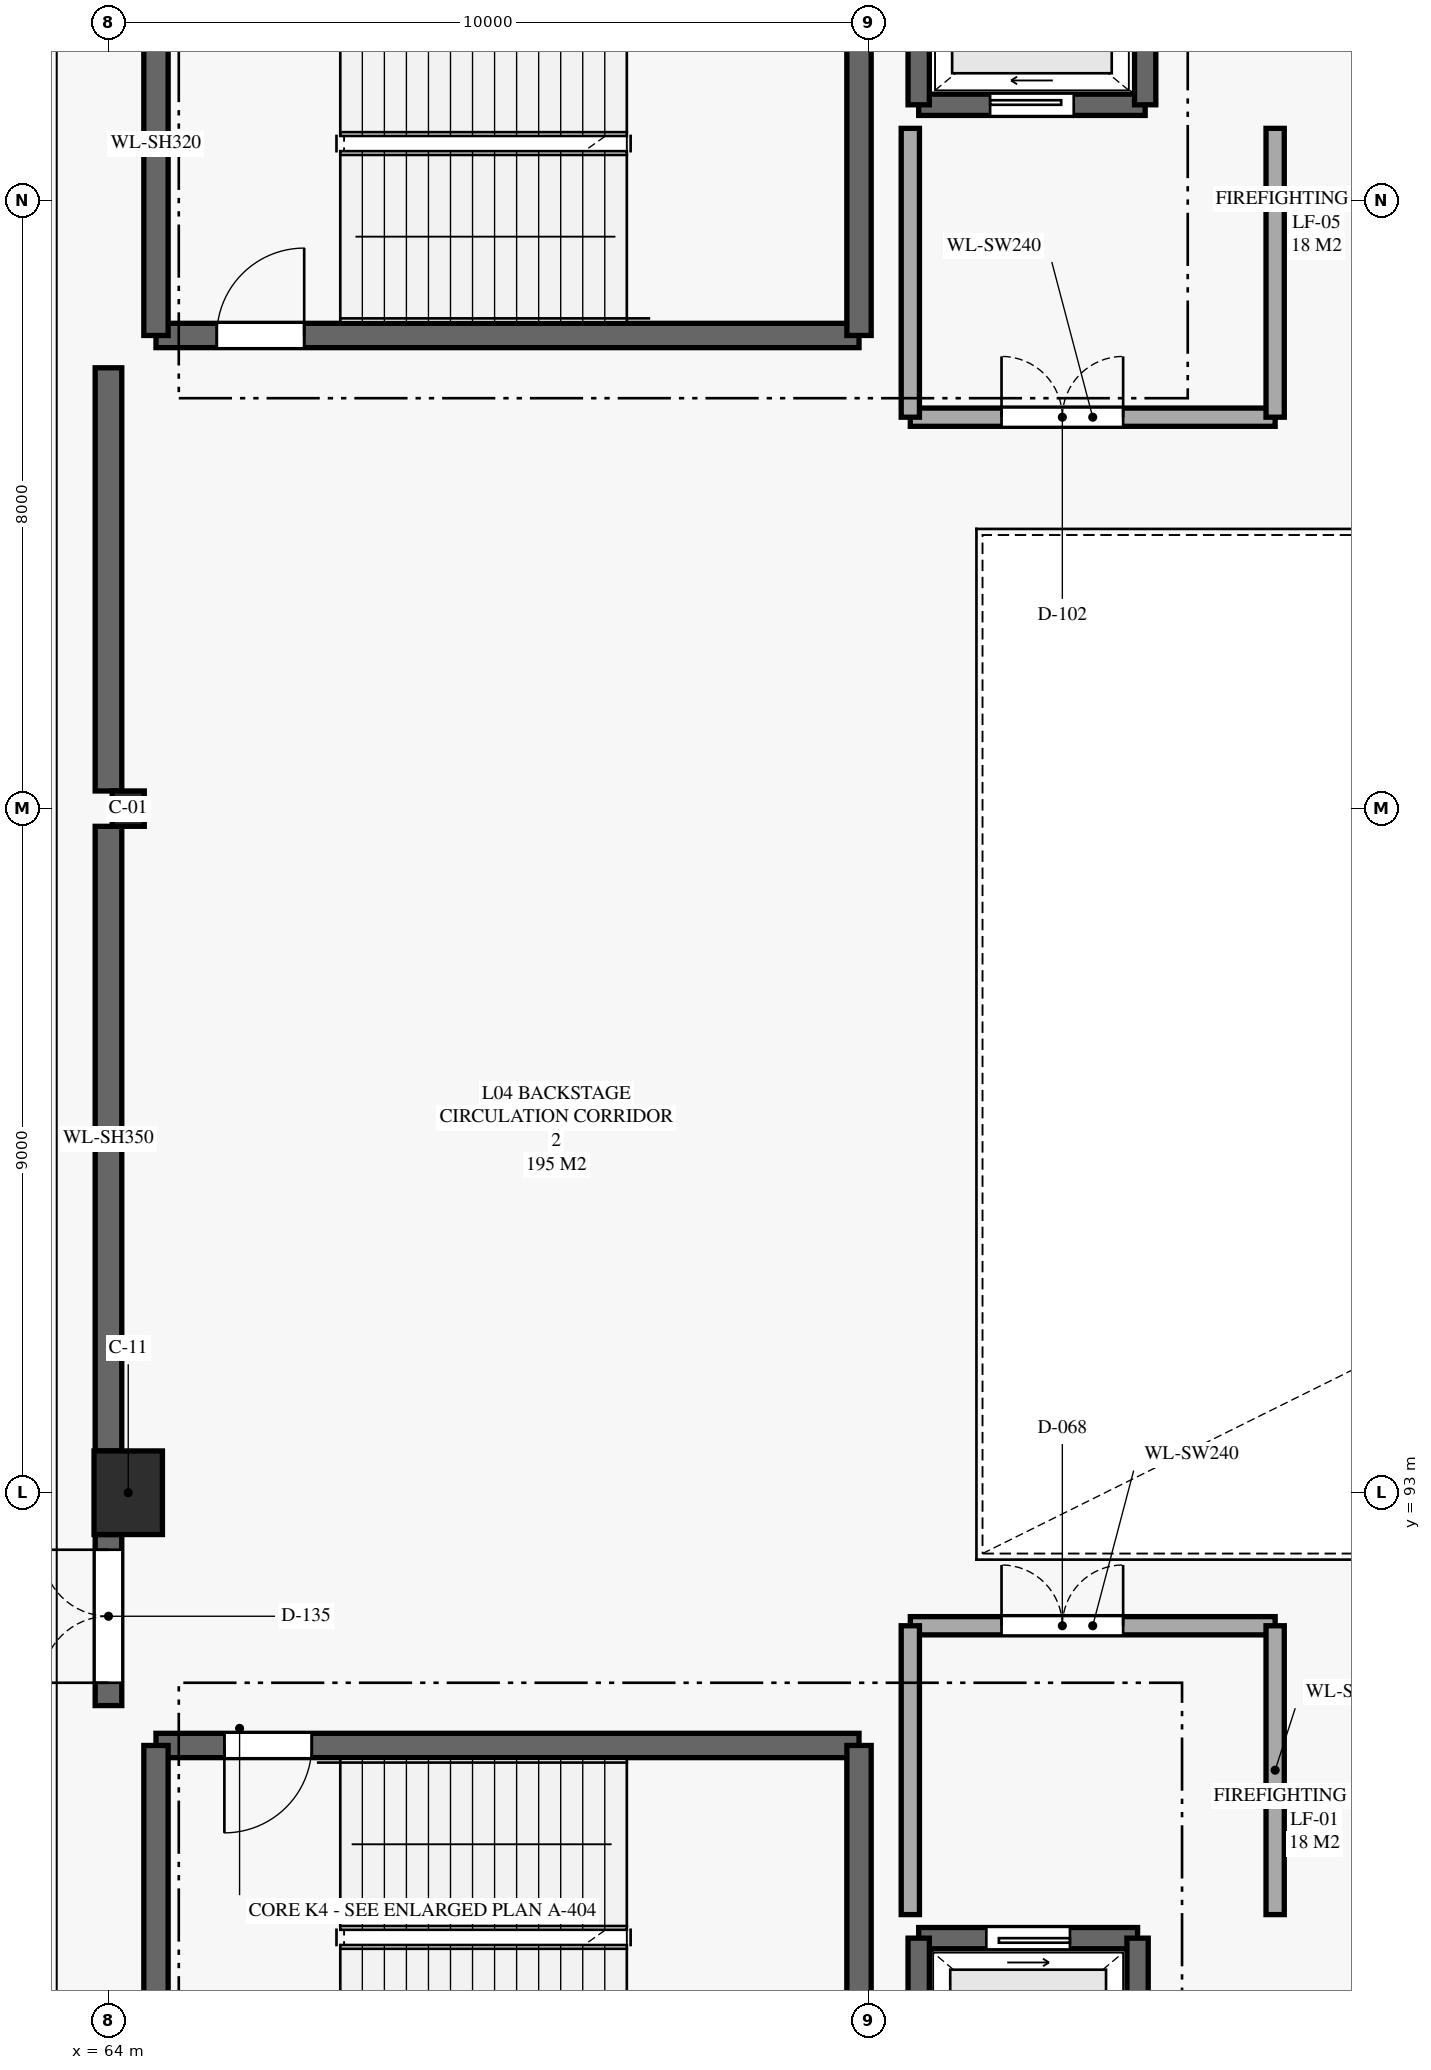
"""IFC4 building model, lengths in metres.
Left out: names, types, materials, properties, quantities, classifications, styles, units other than length and angle.
Written with IfcOpenShell. Run it as: python <this file> out.ifc"""

import sys

from ifc_helpers import new_model, si_unit, direction, frame, frame_2d, origin, origin_2d, place, context, subcontext, project, spatial, rectangle, i_section, extrude, element, fill, save


model = new_model("IFC4")
c1 = context("Model", 3, precision=1e-05, world=origin(), true_north=direction((0.0, 1.0)))
c2 = subcontext(c1, "Body", "Model", "MODEL_VIEW")
j1 = project(units=[si_unit("LENGTHUNIT", "METRE"), si_unit("PLANEANGLEUNIT", "RADIAN")], contexts=[c1])
p1 = place(None, origin())
s1 = spatial("IfcSite", under=j1, at=p1, CompositionType="ELEMENT")
p2 = place(p1, origin())
s2 = spatial("IfcBuilding", under=s1, at=p2, CompositionType="ELEMENT")
p3 = place(p2, frame((0.0, 0.0, 20.0)))
s3 = spatial("IfcBuildingStorey", under=s2, at=p3, CompositionType="ELEMENT", Elevation=20.0)
p4 = place(p3, frame((64.26, 93.0, 0.0), z_axis=(0.0, 0.0, 1.0), x_axis=(1.0, 0.0, 0.0)))
e1 = element("IfcColumn", 1, at=p4, inside=s3, PredefinedType="COLUMN", context=c2, shape_type="SweptSolid", body=[
    extrude(rectangle(XDim=0.9, YDim=1.1, at=origin_2d()), origin(), (0.0, 0.0, 1.0), 4.8),
])
p5 = place(p3, frame((64.26, 102.0, 0.0), z_axis=(0.0, 0.0, 1.0), x_axis=(1.0, 0.0, 0.0)))
e2 = element("IfcColumn", 2, at=p5, inside=s3, PredefinedType="COLUMN", context=c2, shape_type="SweptSolid", body=[
    extrude(i_section(OverallWidth=0.422, OverallDepth=0.465, WebThickness=0.045, FlangeThickness=0.073, FilletRadius=0.02, at=origin_2d()), origin(), (0.0, 0.0, 1.0), 4.8),
])
p6 = place(p3, frame((64.625, 108.225, 0.0), z_axis=(0.0, 0.0, 1.0), x_axis=(1.0, 0.0, 0.0)))
e3 = element("IfcWall", 3, at=p6, inside=s3, PredefinedType="SHEAR", context=c2, shape_type="SweptSolid", body=[
    extrude(rectangle(XDim=9.25, YDim=0.32, at=frame_2d((4.625, 0.0))), origin(), (0.0, 0.0, 1.0), 4.5),
])
p7 = place(p6, frame((0.8, 0.0, 0.0)))
e4 = element("IfcOpeningElement", 4, at=p7, cuts=e3, PredefinedType="OPENING", context=c2, shape_type="SweptSolid", body=[
    extrude(rectangle(XDim=1.15, YDim=2.2, at=frame_2d((0.575, 1.1))), frame((0.0, 0.17, 0.0), z_axis=(0.0, -1.0, 0.0), x_axis=(1.0, 0.0, 0.0)), (0.0, 0.0, 1.0), 0.34),
])
for number, where, z_axis, x_axis in (
    (5, (64.625, 113.275, 0.0), (0.0, 0.0, 1.0), (0.0, -1.0, 0.0)),
    (6, (73.875, 108.225, 0.0), (0.0, 0.0, 1.0), (0.0, 1.0, 0.0)),
):
    element("IfcWall", number, at=place(p3, frame(where, z_axis=z_axis, x_axis=x_axis)), inside=s3, PredefinedType="SHEAR", context=c2, shape_type="SweptSolid", body=[
        extrude(rectangle(XDim=5.05, YDim=0.32, at=frame_2d((2.525, 0.0))), origin(), (0.0, 0.0, 1.0), 4.5),
    ])
p8 = place(p3, frame((73.875, 89.675, 0.0), z_axis=(0.0, 0.0, 1.0), x_axis=(-1.0, 0.0, 0.0)))
e7 = element("IfcWall", 7, at=p8, inside=s3, PredefinedType="SHEAR", context=c2, shape_type="SweptSolid", body=[
    extrude(rectangle(XDim=9.25, YDim=0.32, at=frame_2d((4.625, 0.0))), origin(), (0.0, 0.0, 1.0), 4.5),
])
p9 = place(p8, frame((7.2, 0.0, 0.0)))
e8 = element("IfcOpeningElement", 8, at=p9, cuts=e7, PredefinedType="OPENING", context=c2, shape_type="SweptSolid", body=[
    extrude(rectangle(XDim=1.15, YDim=2.2, at=frame_2d((0.575, 1.1))), frame((0.0, 0.17, 0.0), z_axis=(0.0, -1.0, 0.0), x_axis=(1.0, 0.0, 0.0)), (0.0, 0.0, 1.0), 0.34),
])
for number, where, z_axis, x_axis in (
    (9, (64.625, 89.675, 0.0), (0.0, 0.0, 1.0), (0.0, -1.0, 0.0)),
    (10, (73.875, 84.625, 0.0), (0.0, 0.0, 1.0), (0.0, 1.0, 0.0)),
):
    element("IfcWall", number, at=place(p3, frame(where, z_axis=z_axis, x_axis=x_axis)), inside=s3, PredefinedType="SHEAR", context=c2, shape_type="SweptSolid", body=[
        extrude(rectangle(XDim=5.05, YDim=0.32, at=frame_2d((2.525, 0.0))), origin(), (0.0, 0.0, 1.0), 4.5),
    ])
p10 = place(p3, frame((77.54, 87.14, 0.0), z_axis=(0.0, 0.0, 1.0), x_axis=(-1.0, 0.0, 0.0)))
e11 = element("IfcWall", 11, at=p10, inside=s3, PredefinedType="SHEAR", context=c2, shape_type="SweptSolid", body=[
    extrude(rectangle(XDim=2.88, YDim=0.28, at=frame_2d((1.44, 0.0))), origin(), (0.0, 0.0, 1.0), 4.5),
])
p11 = place(p10, frame((0.89, 0.0, 0.0)))
e12 = element("IfcOpeningElement", 12, at=p11, cuts=e11, PredefinedType="OPENING", context=c2, shape_type="SweptSolid", body=[
    extrude(rectangle(XDim=1.1, YDim=2.2, at=frame_2d((0.55, 1.1))), frame((0.0, 0.15, 0.0), z_axis=(0.0, -1.0, 0.0), x_axis=(1.0, 0.0, 0.0)), (0.0, 0.0, 1.0), 0.3),
])
for number, where, z_axis, x_axis in (
    (13, (74.66, 87.14, 0.0), (0.0, 0.0, 1.0), (0.0, -1.0, 0.0)),
    (14, (77.54, 84.66, 0.0), (0.0, 0.0, 1.0), (0.0, 1.0, 0.0)),
):
    element("IfcWall", number, at=place(p3, frame(where, z_axis=z_axis, x_axis=x_axis)), inside=s3, PredefinedType="SHEAR", context=c2, shape_type="SweptSolid", body=[
        extrude(rectangle(XDim=2.48, YDim=0.28, at=frame_2d((1.24, 0.0))), origin(), (0.0, 0.0, 1.0), 4.5),
    ])
p12 = place(p3, frame((74.55, 91.25, 0.0), z_axis=(0.0, 0.0, 1.0), x_axis=(1.0, 0.0, 0.0)))
e15 = element("IfcWall", 15, at=p12, inside=s3, PredefinedType="SOLIDWALL", context=c2, shape_type="SweptSolid", body=[
    extrude(rectangle(XDim=4.8, YDim=0.24, at=frame_2d((2.4, 0.0))), origin(), (0.0, 0.0, 1.0), 4.5),
])
p13 = place(p12, frame((1.2, 0.0, 0.0)))
e16 = element("IfcOpeningElement", 16, at=p13, cuts=e15, PredefinedType="OPENING", context=c2, shape_type="SweptSolid", body=[
    extrude(rectangle(XDim=1.6, YDim=2.2, at=frame_2d((0.8, 1.1))), frame((0.0, 0.13, 0.0), z_axis=(0.0, -1.0, 0.0), x_axis=(1.0, 0.0, 0.0)), (0.0, 0.0, 1.0), 0.26),
])
for number, where, z_axis, x_axis in (
    (17, (74.55, 91.25, 0.0), (0.0, 0.0, 1.0), (0.0, -1.0, 0.0)),
    (18, (79.35, 87.45, 0.0), (0.0, 0.0, 1.0), (0.0, 1.0, 0.0)),
):
    element("IfcWall", number, at=place(p3, frame(where, z_axis=z_axis, x_axis=x_axis)), inside=s3, PredefinedType="SOLIDWALL", context=c2, shape_type="SweptSolid", body=[
        extrude(rectangle(XDim=3.8, YDim=0.24, at=frame_2d((1.9, 0.0))), origin(), (0.0, 0.0, 1.0), 4.5),
    ])
p14 = place(p3, frame((74.66, 111.26, 0.0), z_axis=(0.0, 0.0, 1.0), x_axis=(1.0, 0.0, 0.0)))
e19 = element("IfcWall", 19, at=p14, inside=s3, PredefinedType="SHEAR", context=c2, shape_type="SweptSolid", body=[
    extrude(rectangle(XDim=2.98, YDim=0.28, at=frame_2d((1.49, 0.0))), origin(), (0.0, 0.0, 1.0), 4.5),
])
p15 = place(p14, frame((0.94, 0.0, 0.0)))
e20 = element("IfcOpeningElement", 20, at=p15, cuts=e19, PredefinedType="OPENING", context=c2, shape_type="SweptSolid", body=[
    extrude(rectangle(XDim=1.1, YDim=2.2, at=frame_2d((0.55, 1.1))), frame((0.0, 0.15, 0.0), z_axis=(0.0, -1.0, 0.0), x_axis=(1.0, 0.0, 0.0)), (0.0, 0.0, 1.0), 0.3),
])
for number, where, z_axis, x_axis in (
    (21, (74.66, 113.74, 0.0), (0.0, 0.0, 1.0), (0.0, -1.0, 0.0)),
    (22, (77.64, 111.26, 0.0), (0.0, 0.0, 1.0), (0.0, 1.0, 0.0)),
):
    element("IfcWall", number, at=place(p3, frame(where, z_axis=z_axis, x_axis=x_axis)), inside=s3, PredefinedType="SHEAR", context=c2, shape_type="SweptSolid", body=[
        extrude(rectangle(XDim=2.48, YDim=0.28, at=frame_2d((1.24, 0.0))), origin(), (0.0, 0.0, 1.0), 4.5),
    ])
p16 = place(p3, frame((74.55, 107.15, 0.0), z_axis=(0.0, 0.0, 1.0), x_axis=(1.0, 0.0, 0.0)))
e23 = element("IfcWall", 23, at=p16, inside=s3, PredefinedType="SOLIDWALL", context=c2, shape_type="SweptSolid", body=[
    extrude(rectangle(XDim=4.8, YDim=0.24, at=frame_2d((2.4, 0.0))), origin(), (0.0, 0.0, 1.0), 4.5),
])
p17 = place(p16, frame((1.2, 0.0, 0.0)))
e24 = element("IfcOpeningElement", 24, at=p17, cuts=e23, PredefinedType="OPENING", context=c2, shape_type="SweptSolid", body=[
    extrude(rectangle(XDim=1.6, YDim=2.2, at=frame_2d((0.8, 1.1))), frame((0.0, 0.13, 0.0), z_axis=(0.0, -1.0, 0.0), x_axis=(1.0, 0.0, 0.0)), (0.0, 0.0, 1.0), 0.26),
])
for number, where, z_axis, x_axis in (
    (25, (74.55, 110.95, 0.0), (0.0, 0.0, 1.0), (0.0, -1.0, 0.0)),
    (26, (79.35, 107.15, 0.0), (0.0, 0.0, 1.0), (0.0, 1.0, 0.0)),
):
    element("IfcWall", number, at=place(p3, frame(where, z_axis=z_axis, x_axis=x_axis)), inside=s3, PredefinedType="SOLIDWALL", context=c2, shape_type="SweptSolid", body=[
        extrude(rectangle(XDim=3.8, YDim=0.24, at=frame_2d((1.9, 0.0))), origin(), (0.0, 0.0, 1.0), 4.5),
    ])
p18 = place(p3, frame((64.0, 90.2, 0.0), z_axis=(0.0, 0.0, 1.0), x_axis=(0.0, 1.0, 0.0)))
e27 = element("IfcWall", 27, at=p18, inside=s3, PredefinedType="SHEAR", context=c2, shape_type="SweptSolid", body=[
    extrude(rectangle(XDim=2.25, YDim=0.35, at=frame_2d((1.125, 0.0))), origin(), (0.0, 0.0, 1.0), 4.5),
])
p19 = place(p18, frame((0.3, 0.0, 0.0)))
e28 = element("IfcOpeningElement", 28, at=p19, cuts=e27, PredefinedType="OPENING", context=c2, shape_type="SweptSolid", body=[
    extrude(rectangle(XDim=1.75, YDim=2.2, at=frame_2d((0.875, 1.1))), frame((0.0, 0.185, 0.0), z_axis=(0.0, -1.0, 0.0), x_axis=(1.0, 0.0, 0.0)), (0.0, 0.0, 1.0), 0.37),
])
p20 = place(p3, frame((64.0, 93.55, 0.0), z_axis=(0.0, 0.0, 1.0), x_axis=(0.0, 1.0, 0.0)))
e29 = element("IfcWall", 29, at=p20, inside=s3, PredefinedType="SHEAR", context=c2, shape_type="SweptSolid", body=[
    extrude(rectangle(XDim=8.218, YDim=0.35, at=frame_2d((4.109, 0.0))), origin(), (0.0, 0.0, 1.0), 4.5),
])
p21 = place(p3, frame((64.0, 102.232, 0.0), z_axis=(0.0, 0.0, 1.0), x_axis=(0.0, 1.0, 0.0)))
e30 = element("IfcWall", 30, at=p21, inside=s3, PredefinedType="SHEAR", context=c2, shape_type="SweptSolid", body=[
    extrude(rectangle(XDim=5.568, YDim=0.35, at=frame_2d((2.784, 0.0))), origin(), (0.0, 0.0, 1.0), 4.5),
])
p22 = place(p7, origin())
e31 = element("IfcDoor", 31, at=p22, inside=s3, OperationType="SINGLE_SWING_RIGHT", PredefinedType="DOOR", context=c2, shape_type="SweptSolid", body=[
    extrude(rectangle(XDim=1.15, YDim=2.2, at=frame_2d((0.575, 1.1))), frame((0.0, 0.025, 0.0), z_axis=(0.0, -1.0, 0.0), x_axis=(1.0, 0.0, 0.0)), (0.0, 0.0, 1.0), 0.05),
])
fill(e4, e31)
p23 = place(p9, origin())
e32 = element("IfcDoor", 32, at=p23, inside=s3, OperationType="SINGLE_SWING_RIGHT", PredefinedType="DOOR", context=c2, shape_type="SweptSolid", body=[
    extrude(rectangle(XDim=1.15, YDim=2.2, at=frame_2d((0.575, 1.1))), frame((0.0, 0.025, 0.0), z_axis=(0.0, -1.0, 0.0), x_axis=(1.0, 0.0, 0.0)), (0.0, 0.0, 1.0), 0.05),
])
fill(e8, e32)
p24 = place(p11, origin())
e33 = element("IfcDoor", 33, at=p24, inside=s3, OperationType="SLIDING_TO_LEFT", PredefinedType="DOOR", context=c2, shape_type="SweptSolid", body=[
    extrude(rectangle(XDim=1.1, YDim=2.2, at=frame_2d((0.55, 1.1))), frame((0.0, 0.025, 0.0), z_axis=(0.0, -1.0, 0.0), x_axis=(1.0, 0.0, 0.0)), (0.0, 0.0, 1.0), 0.05),
])
fill(e12, e33)
p25 = place(p13, origin())
e34 = element("IfcDoor", 34, at=p25, inside=s3, OperationType="DOUBLE_DOOR_SINGLE_SWING", PredefinedType="DOOR", context=c2, shape_type="SweptSolid", body=[
    extrude(rectangle(XDim=1.6, YDim=2.2, at=frame_2d((0.8, 1.1))), frame((0.0, 0.025, 0.0), z_axis=(0.0, -1.0, 0.0), x_axis=(1.0, 0.0, 0.0)), (0.0, 0.0, 1.0), 0.05),
])
fill(e16, e34)
p26 = place(p15, origin())
e35 = element("IfcDoor", 35, at=p26, inside=s3, OperationType="SLIDING_TO_LEFT", PredefinedType="DOOR", context=c2, shape_type="SweptSolid", body=[
    extrude(rectangle(XDim=1.1, YDim=2.2, at=frame_2d((0.55, 1.1))), frame((0.0, 0.025, 0.0), z_axis=(0.0, -1.0, 0.0), x_axis=(1.0, 0.0, 0.0)), (0.0, 0.0, 1.0), 0.05),
])
fill(e20, e35)
p27 = place(p17, origin())
e36 = element("IfcDoor", 36, at=p27, inside=s3, OperationType="DOUBLE_DOOR_SINGLE_SWING", PredefinedType="DOOR", context=c2, shape_type="SweptSolid", body=[
    extrude(rectangle(XDim=1.6, YDim=2.2, at=frame_2d((0.8, 1.1))), frame((0.0, 0.025, 0.0), z_axis=(0.0, -1.0, 0.0), x_axis=(1.0, 0.0, 0.0)), (0.0, 0.0, 1.0), 0.05),
])
fill(e24, e36)
p28 = place(p19, origin())
e37 = element("IfcDoor", 37, at=p28, inside=s3, OperationType="DOUBLE_DOOR_SINGLE_SWING", PredefinedType="DOOR", context=c2, shape_type="SweptSolid", body=[
    extrude(rectangle(XDim=1.75, YDim=2.2, at=frame_2d((0.875, 1.1))), frame((0.0, 0.025, 0.0), z_axis=(0.0, -1.0, 0.0), x_axis=(1.0, 0.0, 0.0)), (0.0, 0.0, 1.0), 0.05),
])
fill(e28, e37)
save(model, sys.argv[1])
